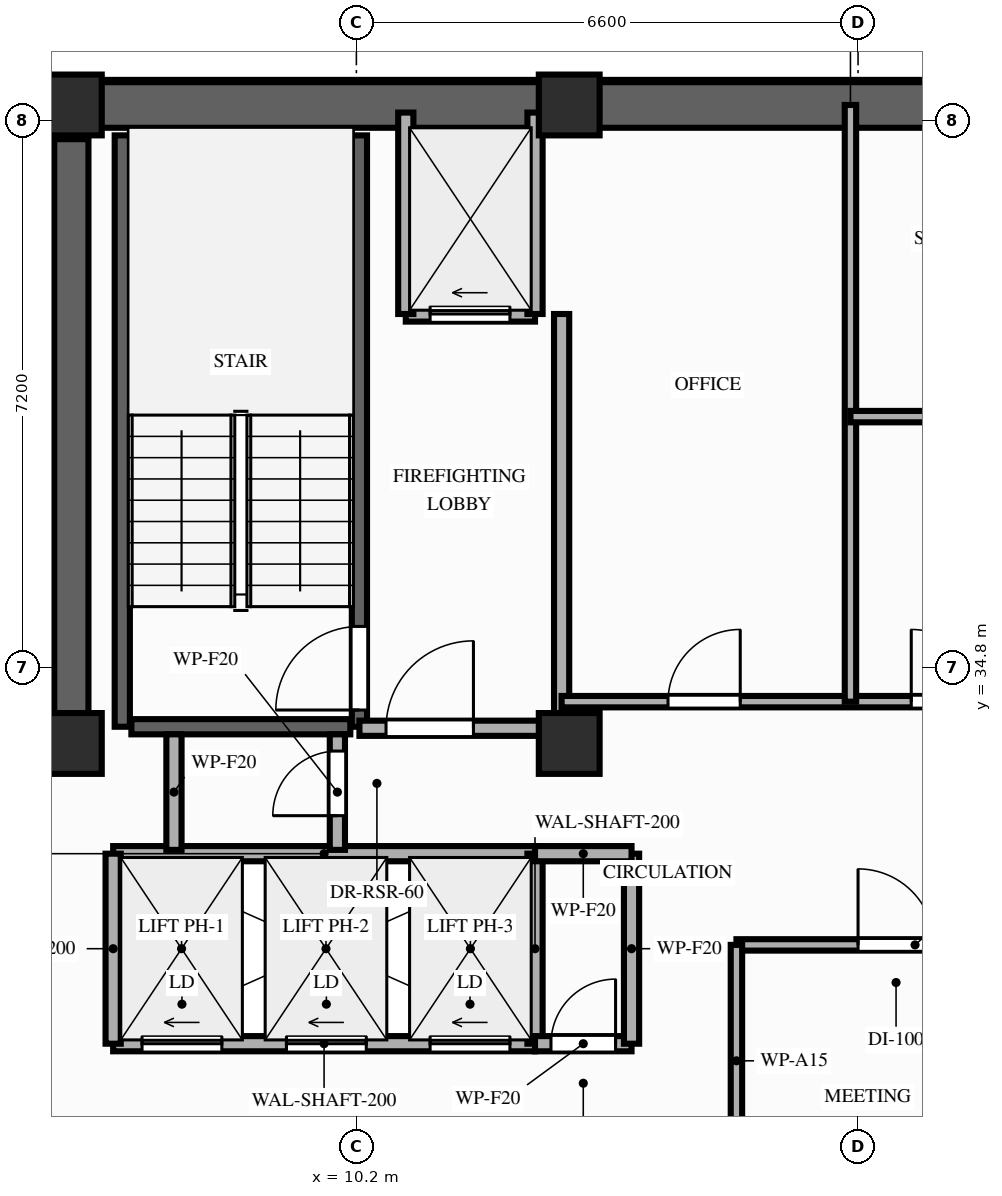
"""IFC4 building model, lengths in metres.
Left out: names, types, materials, properties, quantities, classifications, styles, units other than length and angle.
Written with IfcOpenShell. Run it as: python <this file> out.ifc"""

import sys

from ifc_helpers import new_model, si_unit, direction, frame, frame_2d, origin, origin_2d, place, context, subcontext, project, spatial, rectangle, extrude, element, fill, save


model = new_model("IFC4")
c1 = context("Model", 3, precision=1e-05, world=origin(), true_north=direction((0.0, 1.0)))
c2 = subcontext(c1, "Body", "Model", "MODEL_VIEW")
j1 = project(units=[si_unit("LENGTHUNIT", "METRE"), si_unit("PLANEANGLEUNIT", "RADIAN")], contexts=[c1])
p1 = place(None, origin())
s1 = spatial("IfcSite", under=j1, at=p1, CompositionType="ELEMENT")
p2 = place(p1, origin())
s2 = spatial("IfcBuilding", under=s1, at=p2, CompositionType="ELEMENT")
p3 = place(p2, frame((0.0, 0.0, 228.0)))
s3 = spatial("IfcBuildingStorey", under=s2, at=p3, CompositionType="ELEMENT", Elevation=228.0)
for number, where, z_axis, x_axis in (
    (1, (6.45, 33.8, 0.0), (0.0, 0.0, 1.0), (1.0, 0.0, 0.0)),
    (2, (13.0, 33.8, 0.0), (0.0, 0.0, 1.0), (1.0, 0.0, 0.0)),
    (3, (6.45, 42.2, 0.0), (0.0, 0.0, 1.0), (1.0, 0.0, 0.0)),
    (4, (13.0, 42.2, 0.0), (0.0, 0.0, 1.0), (1.0, 0.0, 0.0)),
):
    element("IfcColumn", number, at=place(p3, frame(where, z_axis=z_axis, x_axis=x_axis)), inside=s3, PredefinedType="COLUMN", context=c2, shape_type="SweptSolid", body=[
        extrude(rectangle(XDim=0.8, YDim=0.8, at=origin_2d()), origin(), (0.0, 0.0, 1.0), 3.2),
    ])
p4 = place(p3, frame((6.45, 42.2, 0.0), z_axis=(0.0, 0.0, 1.0), x_axis=(1.0, 0.0, 0.0)))
e5 = element("IfcWall", 5, at=p4, inside=s3, PredefinedType="SHEAR", context=c2, shape_type="SweptSolid", body=[
    extrude(rectangle(XDim=20.45, YDim=0.6, at=frame_2d((10.225, 0.0))), origin(), (0.0, 0.0, 1.0), 3.02),
])
p5 = place(p3, frame((6.45, 33.8, 0.0), z_axis=(0.0, 0.0, 1.0), x_axis=(0.0, 1.0, 0.0)))
e6 = element("IfcWall", 6, at=p5, inside=s3, PredefinedType="SHEAR", context=c2, shape_type="SweptSolid", body=[
    extrude(rectangle(XDim=7.95, YDim=0.45, at=frame_2d((3.975, 0.0))), origin(), (0.0, 0.0, 1.0), 3.02),
])
p6 = place(p3, frame((7.12, 34.02, 0.0), z_axis=(0.0, 0.0, 1.0), x_axis=(0.0, 1.0, 0.0)))
e7 = element("IfcWall", 7, at=p6, inside=s3, PredefinedType="SHEAR", context=c2, shape_type="SweptSolid", body=[
    extrude(rectangle(XDim=7.78, YDim=0.2, at=frame_2d((3.89, 0.0))), origin(), (0.0, 0.0, 1.0), 3.02),
])
p7 = place(p3, frame((10.24, 34.02, 0.0), z_axis=(0.0, 0.0, 1.0), x_axis=(0.0, 1.0, 0.0)))
e8 = element("IfcWall", 8, at=p7, inside=s3, PredefinedType="SHEAR", context=c2, shape_type="SweptSolid", body=[
    extrude(rectangle(XDim=7.78, YDim=0.2, at=frame_2d((3.89, 0.0))), origin(), (0.0, 0.0, 1.0), 3.02),
])
p8 = place(p7, frame((0.22, 0.0, 0.0)))
e9 = element("IfcOpeningElement", 9, at=p8, cuts=e8, PredefinedType="OPENING", context=c2, shape_type="SweptSolid", body=[
    extrude(rectangle(XDim=1.1, YDim=2.15, at=frame_2d((0.55, 1.075))), frame((0.0, 0.11, 0.0), z_axis=(0.0, -1.0, 0.0), x_axis=(1.0, 0.0, 0.0)), (0.0, 0.0, 1.0), 0.22),
])
p9 = place(p3, frame((7.24, 34.02, 0.0), z_axis=(0.0, 0.0, 1.0), x_axis=(1.0, 0.0, 0.0)))
e10 = element("IfcWall", 10, at=p9, inside=s3, PredefinedType="SHEAR", context=c2, shape_type="SweptSolid", body=[
    extrude(rectangle(XDim=2.88, YDim=0.2, at=frame_2d((1.44, 0.0))), origin(), (0.0, 0.0, 1.0), 3.02),
])
p10 = place(p3, frame((7.0, 29.85, 0.0), z_axis=(0.0, 0.0, 1.0), x_axis=(1.0, 0.0, 0.0)))
e11 = element("IfcWall", 11, at=p10, inside=s3, PredefinedType="MOVABLE", context=c2, shape_type="SweptSolid", body=[
    extrude(rectangle(XDim=5.55, YDim=0.2, at=frame_2d((2.775, 0.0))), origin(), (0.0, 0.0, 1.0), 3.02),
])
p11 = place(p10, frame((0.38, 0.0, 0.0)))
e12 = element("IfcOpeningElement", 12, at=p11, cuts=e11, PredefinedType="OPENING", context=c2, shape_type="SweptSolid", body=[
    extrude(rectangle(XDim=1.05, YDim=2.15, at=frame_2d((0.525, 1.075))), frame((0.0, 0.11, 0.0), z_axis=(0.0, -1.0, 0.0), x_axis=(1.0, 0.0, 0.0)), (0.0, 0.0, 1.0), 0.22),
])
p12 = place(p10, frame((2.28, 0.0, 0.0)))
e13 = element("IfcOpeningElement", 13, at=p12, cuts=e11, PredefinedType="OPENING", context=c2, shape_type="SweptSolid", body=[
    extrude(rectangle(XDim=1.05, YDim=2.15, at=frame_2d((0.525, 1.075))), frame((0.0, 0.11, 0.0), z_axis=(0.0, -1.0, 0.0), x_axis=(1.0, 0.0, 0.0)), (0.0, 0.0, 1.0), 0.22),
])
p13 = place(p10, frame((4.17, 0.0, 0.0)))
e14 = element("IfcOpeningElement", 14, at=p13, cuts=e11, PredefinedType="OPENING", context=c2, shape_type="SweptSolid", body=[
    extrude(rectangle(XDim=1.05, YDim=2.15, at=frame_2d((0.525, 1.075))), frame((0.0, 0.11, 0.0), z_axis=(0.0, -1.0, 0.0), x_axis=(1.0, 0.0, 0.0)), (0.0, 0.0, 1.0), 0.22),
])
p14 = place(p3, frame((7.0, 32.35, 0.0), z_axis=(0.0, 0.0, 1.0), x_axis=(1.0, 0.0, 0.0)))
e15 = element("IfcWall", 15, at=p14, inside=s3, PredefinedType="MOVABLE", context=c2, shape_type="SweptSolid", body=[
    extrude(rectangle(XDim=5.55, YDim=0.2, at=frame_2d((2.775, 0.0))), origin(), (0.0, 0.0, 1.0), 3.02),
])
for number, where, z_axis, x_axis in (
    (16, (7.0, 29.85, 0.0), (0.0, 0.0, 1.0), (0.0, 1.0, 0.0)),
    (17, (12.55, 29.85, 0.0), (0.0, 0.0, 1.0), (0.0, 1.0, 0.0)),
):
    element("IfcWall", number, at=place(p3, frame(where, z_axis=z_axis, x_axis=x_axis)), inside=s3, PredefinedType="MOVABLE", context=c2, shape_type="SweptSolid", body=[
        extrude(rectangle(XDim=2.5, YDim=0.2, at=frame_2d((1.25, 0.0))), origin(), (0.0, 0.0, 1.0), 3.02),
    ])
p15 = place(p3, frame((10.85, 39.45, 0.0), z_axis=(0.0, 0.0, 1.0), x_axis=(1.0, 0.0, 0.0)))
e18 = element("IfcWall", 18, at=p15, inside=s3, PredefinedType="MOVABLE", context=c2, shape_type="SweptSolid", body=[
    extrude(rectangle(XDim=1.7, YDim=0.2, at=frame_2d((0.85, 0.0))), origin(), (0.0, 0.0, 1.0), 3.02),
])
p16 = place(p15, frame((0.32, 0.0, 0.0)))
e19 = element("IfcOpeningElement", 19, at=p16, cuts=e18, PredefinedType="OPENING", context=c2, shape_type="SweptSolid", body=[
    extrude(rectangle(XDim=1.05, YDim=2.15, at=frame_2d((0.525, 1.075))), frame((0.0, 0.11, 0.0), z_axis=(0.0, -1.0, 0.0), x_axis=(1.0, 0.0, 0.0)), (0.0, 0.0, 1.0), 0.22),
])
for number, where, z_axis, x_axis in (
    (20, (10.85, 39.45, 0.0), (0.0, 0.0, 1.0), (0.0, 1.0, 0.0)),
    (21, (12.55, 39.45, 0.0), (0.0, 0.0, 1.0), (0.0, 1.0, 0.0)),
):
    element("IfcWall", number, at=place(p3, frame(where, z_axis=z_axis, x_axis=x_axis)), inside=s3, PredefinedType="MOVABLE", context=c2, shape_type="SweptSolid", body=[
        extrude(rectangle(XDim=2.65, YDim=0.2, at=frame_2d((1.325, 0.0))), origin(), (0.0, 0.0, 1.0), 2.51),
    ])
p17 = place(p3, frame((12.9, 34.0, 0.0), z_axis=(0.0, 0.0, 1.0), x_axis=(0.0, 1.0, 0.0)))
e22 = element("IfcWall", 22, at=p17, inside=s3, PredefinedType="PARTITIONING", context=c2, shape_type="SweptSolid", body=[
    extrude(rectangle(XDim=5.45, YDim=0.2, at=frame_2d((2.725, 0.0))), origin(), (0.0, 0.0, 1.0), 2.51),
])
p18 = place(p3, frame((10.24, 34.0, 0.0), z_axis=(0.0, 0.0, 1.0), x_axis=(1.0, 0.0, 0.0)))
e23 = element("IfcWall", 23, at=p18, inside=s3, PredefinedType="PARTITIONING", context=c2, shape_type="SweptSolid", body=[
    extrude(rectangle(XDim=2.66, YDim=0.2, at=frame_2d((1.33, 0.0))), origin(), (0.0, 0.0, 1.0), 2.51),
])
p19 = place(p18, frame((0.35, 0.0, 0.0)))
e24 = element("IfcOpeningElement", 24, at=p19, cuts=e23, PredefinedType="OPENING", context=c2, shape_type="SweptSolid", body=[
    extrude(rectangle(XDim=1.15, YDim=2.15, at=frame_2d((0.575, 1.075))), frame((0.0, 0.11, 0.0), z_axis=(0.0, -1.0, 0.0), x_axis=(1.0, 0.0, 0.0)), (0.0, 0.0, 1.0), 0.22),
])
p20 = place(p3, frame((12.55, 29.85, 0.0), z_axis=(0.0, 0.0, 1.0), x_axis=(1.0, 0.0, 0.0)))
e25 = element("IfcWall", 25, at=p20, inside=s3, PredefinedType="PARTITIONING", context=c2, shape_type="SweptSolid", body=[
    extrude(rectangle(XDim=1.27, YDim=0.2, at=frame_2d((0.635, 0.0))), origin(), (0.0, 0.0, 1.0), 3.02),
])
p21 = place(p20, frame((0.21, 0.0, 0.0)))
e26 = element("IfcOpeningElement", 26, at=p21, cuts=e25, PredefinedType="OPENING", context=c2, shape_type="SweptSolid", body=[
    extrude(rectangle(XDim=0.85, YDim=2.05, at=frame_2d((0.425, 1.025))), frame((0.0, 0.11, 0.0), z_axis=(0.0, -1.0, 0.0), x_axis=(1.0, 0.0, 0.0)), (0.0, 0.0, 1.0), 0.22),
])
p22 = place(p3, frame((13.82, 29.85, 0.0), z_axis=(0.0, 0.0, 1.0), x_axis=(0.0, 1.0, 0.0)))
e27 = element("IfcWall", 27, at=p22, inside=s3, PredefinedType="PARTITIONING", context=c2, shape_type="SweptSolid", body=[
    extrude(rectangle(XDim=2.5, YDim=0.2, at=frame_2d((1.25, 0.0))), origin(), (0.0, 0.0, 1.0), 3.02),
])
p23 = place(p3, frame((12.55, 32.35, 0.0), z_axis=(0.0, 0.0, 1.0), x_axis=(1.0, 0.0, 0.0)))
e28 = element("IfcWall", 28, at=p23, inside=s3, PredefinedType="PARTITIONING", context=c2, shape_type="SweptSolid", body=[
    extrude(rectangle(XDim=1.27, YDim=0.2, at=frame_2d((0.635, 0.0))), origin(), (0.0, 0.0, 1.0), 3.02),
])
p24 = place(p3, frame((7.8, 32.4, 0.0), z_axis=(0.0, 0.0, 1.0), x_axis=(0.0, 1.0, 0.0)))
e29 = element("IfcWall", 29, at=p24, inside=s3, PredefinedType="PARTITIONING", context=c2, shape_type="SweptSolid", body=[
    extrude(rectangle(XDim=1.52, YDim=0.2, at=frame_2d((0.76, 0.0))), origin(), (0.0, 0.0, 1.0), 2.51),
])
p25 = place(p3, frame((9.95, 32.4, 0.0), z_axis=(0.0, 0.0, 1.0), x_axis=(0.0, 1.0, 0.0)))
e30 = element("IfcWall", 30, at=p25, inside=s3, PredefinedType="PARTITIONING", context=c2, shape_type="SweptSolid", body=[
    extrude(rectangle(XDim=1.52, YDim=0.2, at=frame_2d((0.76, 0.0))), origin(), (0.0, 0.0, 1.0), 2.51),
])
p26 = place(p25, frame((0.45, 0.0, 0.0)))
e31 = element("IfcOpeningElement", 31, at=p26, cuts=e30, PredefinedType="OPENING", context=c2, shape_type="SweptSolid", body=[
    extrude(rectangle(XDim=0.85, YDim=2.05, at=frame_2d((0.425, 1.025))), frame((0.0, 0.11, 0.0), z_axis=(0.0, -1.0, 0.0), x_axis=(1.0, 0.0, 0.0)), (0.0, 0.0, 1.0), 0.22),
])
p27 = place(p3, frame((12.9, 34.35, 0.0), z_axis=(0.0, 0.0, 1.0), x_axis=(1.0, 0.0, 0.0)))
e32 = element("IfcWall", 32, at=p27, inside=s3, PredefinedType="PARTITIONING", context=c2, shape_type="SweptSolid", body=[
    extrude(rectangle(XDim=7.6, YDim=0.15, at=frame_2d((3.8, 0.0))), origin(), (0.0, 0.0, 1.0), 3.02),
])
p28 = place(p27, frame((1.4, 0.0, 0.0)))
e33 = element("IfcOpeningElement", 33, at=p28, cuts=e32, PredefinedType="OPENING", context=c2, shape_type="SweptSolid", body=[
    extrude(rectangle(XDim=0.95, YDim=2.15, at=frame_2d((0.475, 1.075))), frame((0.0, 0.085, 0.0), z_axis=(0.0, -1.0, 0.0), x_axis=(1.0, 0.0, 0.0)), (0.0, 0.0, 1.0), 0.17),
])
p29 = place(p27, frame((4.6, 0.0, 0.0)))
e34 = element("IfcOpeningElement", 34, at=p29, cuts=e32, PredefinedType="OPENING", context=c2, shape_type="SweptSolid", body=[
    extrude(rectangle(XDim=0.95, YDim=2.15, at=frame_2d((0.475, 1.075))), frame((0.0, 0.085, 0.0), z_axis=(0.0, -1.0, 0.0), x_axis=(1.0, 0.0, 0.0)), (0.0, 0.0, 1.0), 0.17),
])
p30 = place(p3, frame((16.7, 34.35, 0.0), z_axis=(0.0, 0.0, 1.0), x_axis=(0.0, 1.0, 0.0)))
e35 = element("IfcWall", 35, at=p30, inside=s3, PredefinedType="PARTITIONING", context=c2, shape_type="SweptSolid", body=[
    extrude(rectangle(XDim=7.85, YDim=0.15, at=frame_2d((3.925, 0.0))), origin(), (0.0, 0.0, 1.0), 2.51),
])
p31 = place(p3, frame((16.7, 38.1, 0.0), z_axis=(0.0, 0.0, 1.0), x_axis=(1.0, 0.0, 0.0)))
e36 = element("IfcWall", 36, at=p31, inside=s3, PredefinedType="PARTITIONING", context=c2, shape_type="SweptSolid", body=[
    extrude(rectangle(XDim=3.75, YDim=0.15, at=frame_2d((1.875, 0.0))), origin(), (0.0, 0.0, 1.0), 3.02),
])
p32 = place(p31, frame((1.45, 0.0, 0.0)))
e37 = element("IfcOpeningElement", 37, at=p32, cuts=e36, PredefinedType="OPENING", context=c2, shape_type="SweptSolid", body=[
    extrude(rectangle(XDim=0.85, YDim=2.05, at=frame_2d((0.425, 1.025))), frame((0.0, 0.085, 0.0), z_axis=(0.0, -1.0, 0.0), x_axis=(1.0, 0.0, 0.0)), (0.0, 0.0, 1.0), 0.17),
])
p33 = place(p3, frame((15.2, 31.15, 0.0), z_axis=(0.0, 0.0, 1.0), x_axis=(1.0, 0.0, 0.0)))
e38 = element("IfcWall", 38, at=p33, inside=s3, PredefinedType="PARTITIONING", context=c2, shape_type="SweptSolid", body=[
    extrude(rectangle(XDim=4.7, YDim=0.15, at=frame_2d((2.35, 0.0))), origin(), (0.0, 0.0, 1.0), 2.51),
])
p34 = place(p33, frame((1.6, 0.0, 0.0)))
e39 = element("IfcOpeningElement", 39, at=p34, cuts=e38, PredefinedType="OPENING", context=c2, shape_type="SweptSolid", body=[
    extrude(rectangle(XDim=1.0, YDim=2.15, at=frame_2d((0.5, 1.075))), frame((0.0, 0.085, 0.0), z_axis=(0.0, -1.0, 0.0), x_axis=(1.0, 0.0, 0.0)), (0.0, 0.0, 1.0), 0.17),
])
p35 = place(p3, frame((15.2, 28.1, 0.0), z_axis=(0.0, 0.0, 1.0), x_axis=(0.0, 1.0, 0.0)))
e40 = element("IfcWall", 40, at=p35, inside=s3, PredefinedType="PARTITIONING", context=c2, shape_type="SweptSolid", body=[
    extrude(rectangle(XDim=3.05, YDim=0.15, at=frame_2d((1.525, 0.0))), origin(), (0.0, 0.0, 1.0), 2.51),
])
p36 = place(p8, origin())
e41 = element("IfcDoor", 41, at=p36, inside=s3, OperationType="SINGLE_SWING_LEFT", PredefinedType="DOOR", context=c2, shape_type="SweptSolid", body=[
    extrude(rectangle(XDim=1.1, YDim=2.15, at=frame_2d((0.55, 1.075))), frame((0.0, 0.025, 0.0), z_axis=(0.0, -1.0, 0.0), x_axis=(1.0, 0.0, 0.0)), (0.0, 0.0, 1.0), 0.05),
])
fill(e9, e41)
p37 = place(p11, origin())
e42 = element("IfcDoor", 42, at=p37, inside=s3, OperationType="SLIDING_TO_LEFT", PredefinedType="DOOR", context=c2, shape_type="SweptSolid", body=[
    extrude(rectangle(XDim=1.05, YDim=2.15, at=frame_2d((0.525, 1.075))), frame((0.0, 0.025, 0.0), z_axis=(0.0, -1.0, 0.0), x_axis=(1.0, 0.0, 0.0)), (0.0, 0.0, 1.0), 0.05),
])
fill(e12, e42)
p38 = place(p12, origin())
e43 = element("IfcDoor", 43, at=p38, inside=s3, OperationType="SLIDING_TO_LEFT", PredefinedType="DOOR", context=c2, shape_type="SweptSolid", body=[
    extrude(rectangle(XDim=1.05, YDim=2.15, at=frame_2d((0.525, 1.075))), frame((0.0, 0.025, 0.0), z_axis=(0.0, -1.0, 0.0), x_axis=(1.0, 0.0, 0.0)), (0.0, 0.0, 1.0), 0.05),
])
fill(e13, e43)
p39 = place(p13, origin())
e44 = element("IfcDoor", 44, at=p39, inside=s3, OperationType="SLIDING_TO_LEFT", PredefinedType="DOOR", context=c2, shape_type="SweptSolid", body=[
    extrude(rectangle(XDim=1.05, YDim=2.15, at=frame_2d((0.525, 1.075))), frame((0.0, 0.025, 0.0), z_axis=(0.0, -1.0, 0.0), x_axis=(1.0, 0.0, 0.0)), (0.0, 0.0, 1.0), 0.05),
])
fill(e14, e44)
p40 = place(p16, origin())
e45 = element("IfcDoor", 45, at=p40, inside=s3, OperationType="SLIDING_TO_LEFT", PredefinedType="DOOR", context=c2, shape_type="SweptSolid", body=[
    extrude(rectangle(XDim=1.05, YDim=2.15, at=frame_2d((0.525, 1.075))), frame((0.0, 0.025, 0.0), z_axis=(0.0, -1.0, 0.0), x_axis=(1.0, 0.0, 0.0)), (0.0, 0.0, 1.0), 0.05),
])
fill(e19, e45)
p41 = place(p19, origin())
e46 = element("IfcDoor", 46, at=p41, inside=s3, OperationType="SINGLE_SWING_RIGHT", PredefinedType="DOOR", context=c2, shape_type="SweptSolid", body=[
    extrude(rectangle(XDim=1.15, YDim=2.15, at=frame_2d((0.575, 1.075))), frame((0.0, 0.025, 0.0), z_axis=(0.0, -1.0, 0.0), x_axis=(1.0, 0.0, 0.0)), (0.0, 0.0, 1.0), 0.05),
])
fill(e24, e46)
p42 = place(p21, origin())
e47 = element("IfcDoor", 47, at=p42, inside=s3, OperationType="SINGLE_SWING_RIGHT", PredefinedType="DOOR", context=c2, shape_type="SweptSolid", body=[
    extrude(rectangle(XDim=0.85, YDim=2.05, at=frame_2d((0.425, 1.025))), frame((0.0, 0.025, 0.0), z_axis=(0.0, -1.0, 0.0), x_axis=(1.0, 0.0, 0.0)), (0.0, 0.0, 1.0), 0.05),
])
fill(e26, e47)
p43 = place(p26, origin())
e48 = element("IfcDoor", 48, at=p43, inside=s3, OperationType="SINGLE_SWING_LEFT", PredefinedType="DOOR", context=c2, shape_type="SweptSolid", body=[
    extrude(rectangle(XDim=0.85, YDim=2.05, at=frame_2d((0.425, 1.025))), frame((0.0, 0.025, 0.0), z_axis=(0.0, -1.0, 0.0), x_axis=(1.0, 0.0, 0.0)), (0.0, 0.0, 1.0), 0.05),
])
fill(e31, e48)
p44 = place(p28, origin())
e49 = element("IfcDoor", 49, at=p44, inside=s3, OperationType="SINGLE_SWING_RIGHT", PredefinedType="DOOR", context=c2, shape_type="SweptSolid", body=[
    extrude(rectangle(XDim=0.95, YDim=2.15, at=frame_2d((0.475, 1.075))), frame((0.0, 0.025, 0.0), z_axis=(0.0, -1.0, 0.0), x_axis=(1.0, 0.0, 0.0)), (0.0, 0.0, 1.0), 0.05),
])
fill(e33, e49)
p45 = place(p29, origin())
e50 = element("IfcDoor", 50, at=p45, inside=s3, OperationType="SINGLE_SWING_LEFT", PredefinedType="DOOR", context=c2, shape_type="SweptSolid", body=[
    extrude(rectangle(XDim=0.95, YDim=2.15, at=frame_2d((0.475, 1.075))), frame((0.0, 0.025, 0.0), z_axis=(0.0, -1.0, 0.0), x_axis=(1.0, 0.0, 0.0)), (0.0, 0.0, 1.0), 0.05),
])
fill(e34, e50)
p46 = place(p34, origin())
e51 = element("IfcDoor", 51, at=p46, inside=s3, OperationType="SINGLE_SWING_LEFT", PredefinedType="DOOR", context=c2, shape_type="SweptSolid", body=[
    extrude(rectangle(XDim=1.0, YDim=2.15, at=frame_2d((0.5, 1.075))), frame((0.0, 0.025, 0.0), z_axis=(0.0, -1.0, 0.0), x_axis=(1.0, 0.0, 0.0)), (0.0, 0.0, 1.0), 0.05),
])
fill(e39, e51)
save(model, sys.argv[1])
